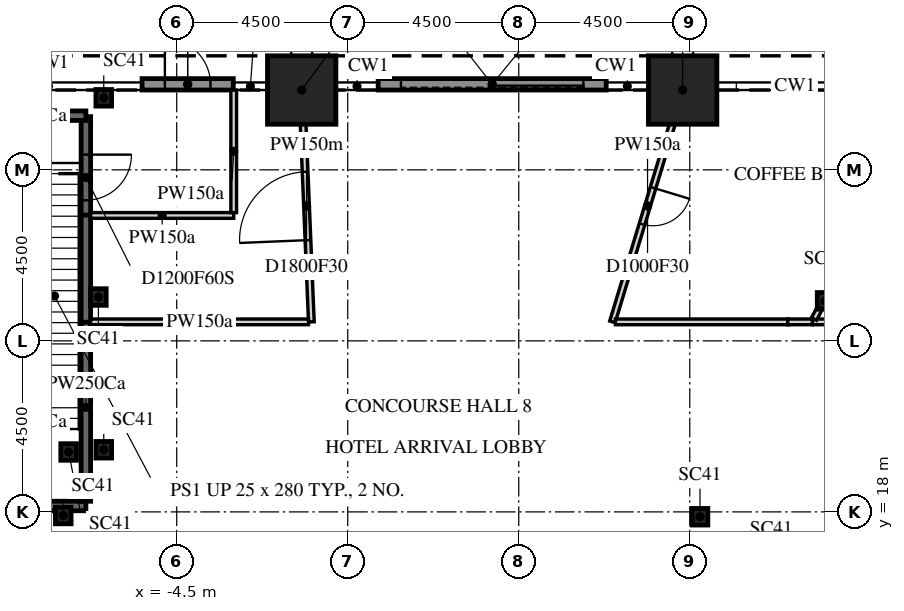
"""IFC4 building model, lengths in metres.
Left out: names, types, materials, properties, quantities, classifications, styles, units other than length and angle.
Written with IfcOpenShell. Run it as: python <this file> out.ifc"""

import sys

from ifc_helpers import new_model, si_unit, direction, frame, frame_2d, origin, origin_2d, place, context, subcontext, project, spatial, rectangle, i_section, extrude, element, fill, save


model = new_model("IFC4")
c1 = context("Model", 3, precision=1e-05, world=origin(), true_north=direction((0.0, 1.0)))
c2 = subcontext(c1, "Body", "Model", "MODEL_VIEW")
j1 = project(units=[si_unit("LENGTHUNIT", "METRE"), si_unit("PLANEANGLEUNIT", "RADIAN")], contexts=[c1])
p1 = place(None, origin())
s1 = spatial("IfcSite", under=j1, at=p1, CompositionType="ELEMENT")
p2 = place(p1, origin())
s2 = spatial("IfcBuilding", under=s1, at=p2, CompositionType="ELEMENT")
p3 = place(p2, origin())
s3 = spatial("IfcBuildingStorey", under=s2, at=p3, CompositionType="ELEMENT", Elevation=0.0)
for number, where, z_axis, x_axis in (
    (1, (8.812, 29.1, -2.1), (0.0, 0.0, 1.0), (1.0, 0.0, 0.0)),
    (2, (-1.211, 29.1, -2.1), (0.0, 0.0, 1.0), (1.0, 0.0, 0.0)),
):
    element("IfcColumn", number, at=place(p3, frame(where, z_axis=z_axis, x_axis=x_axis)), inside=s3, PredefinedType="COLUMN", context=c2, shape_type="SweptSolid", body=[
        extrude(rectangle(XDim=1.8, YDim=1.8, at=origin_2d()), origin(), (0.0, 0.0, 1.0), 10.85),
    ])
for number, where, z_axis, x_axis in (
    (3, (-6.419, 28.895, -2.1), (0.0, 0.0, 1.0), (1.0, 0.0, 0.0)),
    (4, (-6.561, 23.654, -2.1), (0.0, 0.0, 1.0), (1.0, 0.0, 0.0)),
    (5, (12.561, 23.553, -2.1), (0.0, 0.0, 1.0), (1.0, 0.0, 0.0)),
    (6, (9.269, 17.872, -2.1), (0.0, 0.0, 1.0), (1.0, 0.0, 0.0)),
    (7, (-7.485, 17.905, -2.1), (0.0, 0.0, 1.0), (1.0, 0.0, 0.0)),
    (8, (-7.344, 19.576, -2.1), (0.0, 0.0, 1.0), (1.0, 0.0, 0.0)),
    (9, (-6.419, 19.635, -2.1), (0.0, 0.0, 1.0), (1.0, 0.0, 0.0)),
):
    element("IfcColumn", number, at=place(p3, frame(where, z_axis=z_axis, x_axis=x_axis)), inside=s3, PredefinedType="COLUMN", context=c2, shape_type="SweptSolid", body=[
        extrude(i_section(OverallWidth=0.412, OverallDepth=0.437, WebThickness=0.036, FlangeThickness=0.058, FilletRadius=0.015, at=origin_2d()), origin(), (0.0, 0.0, 1.0), 10.85),
    ])
p4 = place(p3, frame((6.801, 29.25, 0.0), z_axis=(0.0, 0.0, 1.0), x_axis=(-1.0, 0.0, 0.0)))
e10 = element("IfcWall", 10, at=p4, inside=s3, PredefinedType="SOLIDWALL", context=c2, shape_type="SweptSolid", body=[
    extrude(rectangle(XDim=6.0, YDim=0.3, at=frame_2d((3.0, 0.0))), origin(), (0.0, 0.0, 1.0), 7.823),
])
p5 = place(p4, frame((0.6, 0.0, 0.0)))
e11 = element("IfcOpeningElement", 11, at=p5, cuts=e10, PredefinedType="OPENING", context=c2, shape_type="SweptSolid", body=[
    extrude(rectangle(XDim=4.8, YDim=4.5, at=frame_2d((2.4, 2.25))), frame((0.0, 0.16, 0.0), z_axis=(0.0, -1.0, 0.0), x_axis=(1.0, 0.0, 0.0)), (0.0, 0.0, 1.0), 0.32),
])
p6 = place(p3, frame((-5.411, 29.25, 0.0), z_axis=(0.0, 0.0, 1.0), x_axis=(1.0, 0.0, 0.0)))
e12 = element("IfcWall", 12, at=p6, inside=s3, PredefinedType="SOLIDWALL", context=c2, shape_type="SweptSolid", body=[
    extrude(rectangle(XDim=2.4, YDim=0.3, at=frame_2d((1.2, 0.0))), origin(), (0.0, 0.0, 1.0), 7.823),
])
p7 = place(p6, frame((0.6, 0.0, 0.0)))
e13 = element("IfcOpeningElement", 13, at=p7, cuts=e12, PredefinedType="OPENING", context=c2, shape_type="SweptSolid", body=[
    extrude(rectangle(XDim=1.2, YDim=2.1, at=frame_2d((0.6, 1.05))), frame((0.0, 0.16, 0.0), z_axis=(0.0, -1.0, 0.0), x_axis=(1.0, 0.0, 0.0)), (0.0, 0.0, 1.0), 0.32),
])
p8 = place(p3, frame((-6.89, 18.155, 0.0), z_axis=(0.0, 0.0, 1.0), x_axis=(-1.0, 0.0, 0.0)))
e14 = element("IfcWall", 14, at=p8, inside=s3, PredefinedType="PARTITIONING", context=c2, shape_type="SweptSolid", body=[
    extrude(rectangle(XDim=3.075, YDim=0.25, at=frame_2d((1.538, 0.0))), origin(), (0.0, 0.0, 1.0), 8.75),
])
p9 = place(p8, frame((0.938, 0.0, 0.0)))
e15 = element("IfcOpeningElement", 15, at=p9, cuts=e14, PredefinedType="OPENING", context=c2, shape_type="SweptSolid", body=[
    extrude(rectangle(XDim=1.2, YDim=2.1, at=frame_2d((0.6, 1.05))), frame((0.0, 0.135, 0.0), z_axis=(0.0, -1.0, 0.0), x_axis=(1.0, 0.0, 0.0)), (0.0, 0.0, 1.0), 0.27),
])
p10 = place(p3, frame((-6.89, 18.51, 0.0), z_axis=(0.0, 0.0, 1.0), x_axis=(0.0, -1.0, 0.0)))
e16 = element("IfcWall", 16, at=p10, inside=s3, PredefinedType="PARTITIONING", context=c2, shape_type="SweptSolid", body=[
    extrude(rectangle(XDim=0.23, YDim=0.25, at=frame_2d((0.115, 0.0))), origin(), (0.0, 0.0, 1.0), 8.75),
])
p11 = place(p3, frame((-6.89, 23.01, 0.0), z_axis=(0.0, 0.0, 1.0), x_axis=(0.0, -1.0, 0.0)))
e17 = element("IfcWall", 17, at=p11, inside=s3, PredefinedType="PARTITIONING", context=c2, shape_type="SweptSolid", body=[
    extrude(rectangle(XDim=4.52, YDim=0.25, at=frame_2d((2.26, 0.0))), origin(), (0.0, 0.0, 1.0), 8.75),
])
p12 = place(p3, frame((-6.89, 28.4, 0.0), z_axis=(0.0, 0.0, 1.0), x_axis=(0.0, -1.0, 0.0)))
e18 = element("IfcWall", 18, at=p12, inside=s3, PredefinedType="PARTITIONING", context=c2, shape_type="SweptSolid", body=[
    extrude(rectangle(XDim=2.6, YDim=0.25, at=frame_2d((1.3, 0.0))), origin(), (0.0, 0.0, 1.0), 8.75),
])
p13 = place(p12, frame((1.0, 0.0, 0.0)))
e19 = element("IfcOpeningElement", 19, at=p13, cuts=e18, PredefinedType="OPENING", context=c2, shape_type="SweptSolid", body=[
    extrude(rectangle(XDim=1.2, YDim=2.1, at=frame_2d((0.6, 1.05))), frame((0.0, 0.135, 0.0), z_axis=(0.0, -1.0, 0.0), x_axis=(1.0, 0.0, 0.0)), (0.0, 0.0, 1.0), 0.27),
])
p14 = place(p3, frame((-6.89, 25.81, 0.0), z_axis=(0.0, 0.0, 1.0), x_axis=(0.0, -1.0, 0.0)))
e20 = element("IfcWall", 20, at=p14, inside=s3, PredefinedType="PARTITIONING", context=c2, shape_type="SweptSolid", body=[
    extrude(rectangle(XDim=2.82, YDim=0.25, at=frame_2d((1.41, 0.0))), origin(), (0.0, 0.0, 1.0), 8.75),
])
p15 = place(p3, frame((-6.89, 28.425, 0.0), z_axis=(0.0, 0.0, 1.0), x_axis=(-1.0, 0.0, 0.0)))
e21 = element("IfcWall", 21, at=p15, inside=s3, PredefinedType="PARTITIONING", context=c2, shape_type="SweptSolid", body=[
    extrude(rectangle(XDim=3.075, YDim=0.25, at=frame_2d((1.538, 0.0))), origin(), (0.0, 0.0, 1.0), 8.75),
])
p16 = place(p3, frame((-3.0, 25.8, 0.0), z_axis=(0.0, 0.0, 1.0), x_axis=(-1.0, 0.0, 0.0)))
e22 = element("IfcWall", 22, at=p16, inside=s3, PredefinedType="PARTITIONING", context=c2, shape_type="SweptSolid", body=[
    extrude(rectangle(XDim=3.765, YDim=0.15, at=frame_2d((1.882, 0.0))), origin(), (0.0, 0.0, 1.0), 8.75),
])
p17 = place(p3, frame((-3.0, 29.1, 0.0), z_axis=(0.0, 0.0, 1.0), x_axis=(0.0, -1.0, 0.0)))
e23 = element("IfcWall", 23, at=p17, inside=s3, PredefinedType="PARTITIONING", context=c2, shape_type="SweptSolid", body=[
    extrude(rectangle(XDim=3.225, YDim=0.15, at=frame_2d((1.613, 0.0))), origin(), (0.0, 0.0, 1.0), 8.75),
])
p18 = place(p3, frame((-0.957, 23.0, 0.0), z_axis=(0.0, 0.0, 1.0), x_axis=(-0.041587299648, 0.999134874033, 0.0)))
e24 = element("IfcWall", 24, at=p18, inside=s3, PredefinedType="PARTITIONING", context=c2, shape_type="SweptSolid", body=[
    extrude(rectangle(XDim=6.105, YDim=0.15, at=frame_2d((3.053, 0.0))), origin(), (0.0, 0.0, 1.0), 8.297),
])
p19 = place(p18, frame((2.153, 0.0, 0.0)))
e25 = element("IfcOpeningElement", 25, at=p19, cuts=e24, PredefinedType="OPENING", context=c2, shape_type="SweptSolid", body=[
    extrude(rectangle(XDim=1.8, YDim=2.1, at=frame_2d((0.9, 1.05))), frame((0.0, 0.085, 0.0), z_axis=(0.0, -1.0, 0.0), x_axis=(1.0, 0.0, 0.0)), (0.0, 0.0, 1.0), 0.17),
])
p20 = place(p3, frame((-1.032, 23.0, 0.0), z_axis=(0.0, 0.0, 1.0), x_axis=(-1.0, 0.0, 0.0)))
e26 = element("IfcWall", 26, at=p20, inside=s3, PredefinedType="PARTITIONING", context=c2, shape_type="SweptSolid", body=[
    extrude(rectangle(XDim=5.733, YDim=0.15, at=frame_2d((2.866, 0.0))), origin(), (0.0, 0.0, 1.0), 8.75),
])
p21 = place(p3, frame((8.813, 29.1, 0.0), z_axis=(0.0, 0.0, 1.0), x_axis=(-0.289919157487, -0.957051138718, 0.0)))
e27 = element("IfcWall", 27, at=p21, inside=s3, PredefinedType="PARTITIONING", context=c2, shape_type="SweptSolid", body=[
    extrude(rectangle(XDim=6.374, YDim=0.15, at=frame_2d((3.187, 0.0))), origin(), (0.0, 0.0, 1.0), 8.75),
])
p22 = place(p21, frame((2.687, 0.0, 0.0)))
e28 = element("IfcOpeningElement", 28, at=p22, cuts=e27, PredefinedType="OPENING", context=c2, shape_type="SweptSolid", body=[
    extrude(rectangle(XDim=1.0, YDim=2.1, at=frame_2d((0.5, 1.05))), frame((0.0, 0.085, 0.0), z_axis=(0.0, -1.0, 0.0), x_axis=(1.0, 0.0, 0.0)), (0.0, 0.0, 1.0), 0.17),
])
p23 = place(p3, frame((11.599, 23.0, 0.0), z_axis=(0.0, 0.0, 1.0), x_axis=(-1.0, 0.0, 0.0)))
e29 = element("IfcWall", 29, at=p23, inside=s3, PredefinedType="PARTITIONING", context=c2, shape_type="SweptSolid", body=[
    extrude(rectangle(XDim=4.556, YDim=0.15, at=frame_2d((2.278, 0.0))), origin(), (0.0, 0.0, 1.0), 8.75),
])
p24 = place(p3, frame((12.229, 23.0, 0.0), z_axis=(0.0, 0.0, 1.0), x_axis=(-1.0, 0.0, 0.0)))
e30 = element("IfcWall", 30, at=p24, inside=s3, PredefinedType="PARTITIONING", context=c2, shape_type="SweptSolid", body=[
    extrude(rectangle(XDim=0.652, YDim=0.15, at=frame_2d((0.326, 0.0))), origin(), (0.0, 0.0, 1.0), 8.75),
])
p25 = place(p3, frame((13.279, 23.0, 0.0), z_axis=(0.0, 0.0, 1.0), x_axis=(-1.0, 0.0, 0.0)))
e31 = element("IfcWall", 31, at=p25, inside=s3, PredefinedType="PARTITIONING", context=c2, shape_type="SweptSolid", body=[
    extrude(rectangle(XDim=1.05, YDim=0.15, at=frame_2d((0.525, 0.0))), origin(), (0.0, 0.0, 1.0), 8.75),
])
p26 = place(p3, frame((15.261, 28.701, 0.0), z_axis=(0.0, 0.0, 1.0), x_axis=(-0.469569765, -0.88289537081, 0.0)))
e32 = element("IfcWall", 32, at=p26, inside=s3, PredefinedType="PARTITIONING", context=c2, shape_type="SweptSolid", body=[
    extrude(rectangle(XDim=6.372, YDim=0.15, at=frame_2d((3.186, 0.0))), origin(), (0.0, 0.0, 1.0), 8.297),
])
p27 = place(p5, frame((0.0, -0.025, 0.0)))
e33 = element("IfcDoor", 33, at=p27, inside=s3, OperationType="DOUBLE_DOOR_SLIDING", PredefinedType="DOOR", context=c2, shape_type="SweptSolid", body=[
    extrude(rectangle(XDim=4.8, YDim=4.5, at=frame_2d((2.4, 2.25))), frame((0.0, 0.025, 0.0), z_axis=(0.0, -1.0, 0.0), x_axis=(1.0, 0.0, 0.0)), (0.0, 0.0, 1.0), 0.05),
])
fill(e11, e33)
p28 = place(p7, frame((0.0, -0.025, 0.0)))
e34 = element("IfcDoor", 34, at=p28, inside=s3, OperationType="SINGLE_SWING_LEFT", PredefinedType="DOOR", context=c2, shape_type="SweptSolid", body=[
    extrude(rectangle(XDim=1.2, YDim=2.1, at=frame_2d((0.6, 1.05))), frame((0.0, 0.025, 0.0), z_axis=(0.0, -1.0, 0.0), x_axis=(1.0, 0.0, 0.0)), (0.0, 0.0, 1.0), 0.05),
])
fill(e13, e34)
p29 = place(p13, origin())
e35 = element("IfcDoor", 35, at=p29, inside=s3, OperationType="SINGLE_SWING_RIGHT", PredefinedType="DOOR", context=c2, shape_type="SweptSolid", body=[
    extrude(rectangle(XDim=1.2, YDim=2.1, at=frame_2d((0.6, 1.05))), frame((0.0, 0.025, 0.0), z_axis=(0.0, -1.0, 0.0), x_axis=(1.0, 0.0, 0.0)), (0.0, 0.0, 1.0), 0.05),
])
fill(e19, e35)
p30 = place(p19, origin())
e36 = element("IfcDoor", 36, at=p30, inside=s3, OperationType="DOUBLE_DOOR_SINGLE_SWING", PredefinedType="DOOR", context=c2, shape_type="SweptSolid", body=[
    extrude(rectangle(XDim=1.8, YDim=2.1, at=frame_2d((0.9, 1.05))), frame((0.0, 0.025, 0.0), z_axis=(0.0, -1.0, 0.0), x_axis=(1.0, 0.0, 0.0)), (0.0, 0.0, 1.0), 0.05),
])
fill(e25, e36)
p31 = place(p22, origin())
e37 = element("IfcDoor", 37, at=p31, inside=s3, OperationType="SINGLE_SWING_RIGHT", PredefinedType="DOOR", context=c2, shape_type="SweptSolid", body=[
    extrude(rectangle(XDim=1.0, YDim=2.1, at=frame_2d((0.5, 1.05))), frame((0.0, 0.025, 0.0), z_axis=(0.0, -1.0, 0.0), x_axis=(1.0, 0.0, 0.0)), (0.0, 0.0, 1.0), 0.05),
])
fill(e28, e37)
save(model, sys.argv[1])
